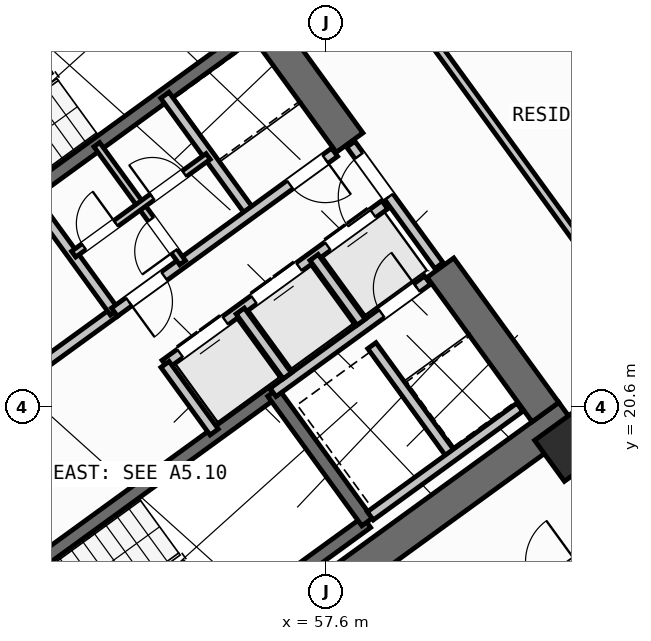
"""IFC4 building model, lengths in metres.
Left out: names, types, materials, properties, quantities, classifications, styles, units other than length and angle.
Written with IfcOpenShell. Run it as: python <this file> out.ifc"""

import sys

from ifc_helpers import new_model, si_unit, direction, frame, frame_2d, origin, origin_2d, place, context, subcontext, project, spatial, rectangle, hollow_rectangle, extrude, source, transform, mapped, element, fill, save


model = new_model("IFC4")
c1 = context("Model", 3, precision=1e-05, world=origin(), true_north=direction((0.0, 1.0)))
c2 = subcontext(c1, "Body", "Model", "MODEL_VIEW")
j1 = project(units=[si_unit("LENGTHUNIT", "METRE"), si_unit("PLANEANGLEUNIT", "RADIAN")], contexts=[c1])
p1 = place(None, origin())
s1 = spatial("IfcSite", under=j1, at=p1, CompositionType="ELEMENT")
p2 = place(p1, origin())
s2 = spatial("IfcBuilding", under=s1, at=p2, CompositionType="ELEMENT")
p3 = place(p2, frame((0.0, 0.0, 38.4)))
s3 = spatial("IfcBuildingStorey", under=s2, at=p3, CompositionType="ELEMENT", Elevation=38.4)
p4 = place(p3, frame((52.318, 13.11, 0.0), z_axis=(0.0, 0.0, 1.0), x_axis=(0.809019445368, 0.587781878776, 0.0)))
e1 = element("IfcWall", 1, at=p4, inside=s3, PredefinedType="SHEAR", context=c2, shape_type="SweptSolid", body=[
    extrude(rectangle(XDim=12.44, YDim=0.65, at=frame_2d((6.22, 0.0))), origin(), (0.0, 0.0, 1.0), 3.35),
])
p5 = place(p3, frame((44.325, 24.113, 0.0), z_axis=(0.0, 0.0, 1.0), x_axis=(0.809012664862, 0.58779121131, 0.0)))
e2 = element("IfcWall", 2, at=p5, inside=s3, PredefinedType="SHEAR", context=c2, shape_type="SweptSolid", body=[
    extrude(rectangle(XDim=12.44, YDim=0.65, at=frame_2d((6.22, 0.0))), origin(), (0.0, 0.0, 1.0), 3.35),
])
p6 = place(p3, frame((61.929, 20.494, 0.0), z_axis=(0.0, 0.0, 1.0), x_axis=(-0.58782982593, 0.808984607855, 0.0)))
e3 = element("IfcWall", 3, at=p6, inside=s3, PredefinedType="SHEAR", context=c2, shape_type="SweptSolid", body=[
    extrude(rectangle(XDim=3.525, YDim=0.65, at=frame_2d((1.762, 0.0))), origin(), (0.0, 0.0, 1.0), 3.35),
])
p7 = place(p3, frame((58.064, 25.813, 0.0), z_axis=(0.0, 0.0, 1.0), x_axis=(-0.58777996584, 0.809020835181, 0.0)))
e4 = element("IfcWall", 4, at=p7, inside=s3, PredefinedType="SHEAR", context=c2, shape_type="SweptSolid", body=[
    extrude(rectangle(XDim=6.375, YDim=0.65, at=frame_2d((3.188, 0.0))), origin(), (0.0, 0.0, 1.0), 3.35),
])
m1 = source(origin(), c2, "Body", "SweptSolid", [
    extrude(hollow_rectangle(XDim=1.0, YDim=1.0, WallThickness=0.04, at=origin_2d()), origin(), (0.0, 0.0, 1.0), 3.6),
])
p8 = place(p3, frame((62.414, 19.827, 0.0), z_axis=(0.0, 0.0, 1.0), x_axis=(0.809016994375, 0.587785252292, 0.0)))
e5 = element("IfcColumn", 5, at=p8, inside=s3, PredefinedType="COLUMN", context=c2, shape_type="MappedRepresentation", body=[
    mapped(m1, transform((0.0, 0.0, 0.0), scale=1.0)),
])
p9 = place(p3, frame((43.938, 25.192, 0.0), z_axis=(0.0, 0.0, 1.0), x_axis=(0.809016324578, 0.587786174187, 0.0)))
e6 = element("IfcWall", 6, at=p9, inside=s3, PredefinedType="STANDARD", context=c2, shape_type="SweptSolid", body=[
    extrude(rectangle(XDim=17.587, YDim=0.32, at=frame_2d((8.794, 0.0))), origin(), (0.0, 0.0, 1.0), 3.35),
])
p10 = place(p9, frame((14.914, 0.0, 0.0)))
e7 = element("IfcOpeningElement", 7, at=p10, cuts=e6, PredefinedType="OPENING", context=c2, shape_type="SweptSolid", body=[
    extrude(rectangle(XDim=1.05, YDim=2.15, at=frame_2d((0.525, 1.075))), frame((0.0, 0.17, 0.0), z_axis=(0.0, -1.0, 0.0), x_axis=(1.0, 0.0, 0.0)), (0.0, 0.0, 1.0), 0.34),
])
p11 = place(p9, frame((2.169, 0.0, 0.8)))
e8 = element("IfcOpeningElement", 8, at=p11, cuts=e6, PredefinedType="OPENING", context=c2, shape_type="SweptSolid", body=[
    extrude(rectangle(XDim=2.1, YDim=1.55, at=frame_2d((1.05, 0.775))), frame((0.0, 0.17, 0.0), z_axis=(0.0, -1.0, 0.0), x_axis=(1.0, 0.0, 0.0)), (0.0, 0.0, 1.0), 0.34),
])
p12 = place(p9, frame((7.319, 0.0, 0.8)))
e9 = element("IfcOpeningElement", 9, at=p12, cuts=e6, PredefinedType="OPENING", context=c2, shape_type="SweptSolid", body=[
    extrude(rectangle(XDim=2.1, YDim=1.55, at=frame_2d((1.05, 0.775))), frame((0.0, 0.17, 0.0), z_axis=(0.0, -1.0, 0.0), x_axis=(1.0, 0.0, 0.0)), (0.0, 0.0, 1.0), 0.34),
])
p13 = place(p3, frame((58.455, 35.484, 0.0), z_axis=(0.0, 0.0, 1.0), x_axis=(0.587783625747, -0.809018176127, 0.0)))
e10 = element("IfcWall", 10, at=p13, inside=s3, PredefinedType="STANDARD", context=c2, shape_type="SweptSolid", body=[
    extrude(rectangle(XDim=21.587, YDim=0.32, at=frame_2d((10.794, 0.0))), origin(), (0.0, 0.0, 1.0), 2.725),
])
p14 = place(p13, frame((1.529, 0.0, 0.85)))
e11 = element("IfcOpeningElement", 11, at=p14, cuts=e10, PredefinedType="OPENING", context=c2, shape_type="SweptSolid", body=[
    extrude(rectangle(XDim=1.8, YDim=1.5, at=frame_2d((0.9, 0.75))), frame((0.0, 0.17, 0.0), z_axis=(0.0, -1.0, 0.0), x_axis=(1.0, 0.0, 0.0)), (0.0, 0.0, 1.0), 0.34),
])
p15 = place(p13, frame((10.444, 0.0, 0.85)))
e12 = element("IfcOpeningElement", 12, at=p15, cuts=e10, PredefinedType="OPENING", context=c2, shape_type="SweptSolid", body=[
    extrude(rectangle(XDim=1.8, YDim=1.5, at=frame_2d((0.9, 0.75))), frame((0.0, 0.17, 0.0), z_axis=(0.0, -1.0, 0.0), x_axis=(1.0, 0.0, 0.0)), (0.0, 0.0, 1.0), 0.34),
])
p16 = place(p13, frame((17.595, 0.0, 0.85)))
e13 = element("IfcOpeningElement", 13, at=p16, cuts=e10, PredefinedType="OPENING", context=c2, shape_type="SweptSolid", body=[
    extrude(rectangle(XDim=1.5, YDim=1.5, at=frame_2d((0.75, 0.75))), frame((0.0, 0.17, 0.0), z_axis=(0.0, -1.0, 0.0), x_axis=(1.0, 0.0, 0.0)), (0.0, 0.0, 1.0), 0.34),
])
p17 = place(p3, frame((71.098, 17.731, 0.0), z_axis=(0.0, 0.0, 1.0), x_axis=(-0.809021120468, -0.587779573171, 0.0)))
e14 = element("IfcWall", 14, at=p17, inside=s3, PredefinedType="STANDARD", context=c2, shape_type="SweptSolid", body=[
    extrude(rectangle(XDim=17.588, YDim=0.32, at=frame_2d((8.794, 0.0))), origin(), (0.0, 0.0, 1.0), 3.35),
])
p18 = place(p17, frame((1.624, 0.0, 0.0)))
e15 = element("IfcOpeningElement", 15, at=p18, cuts=e14, PredefinedType="OPENING", context=c2, shape_type="SweptSolid", body=[
    extrude(rectangle(XDim=1.05, YDim=2.15, at=frame_2d((0.525, 1.075))), frame((0.0, 0.17, 0.0), z_axis=(0.0, -1.0, 0.0), x_axis=(1.0, 0.0, 0.0)), (0.0, 0.0, 1.0), 0.34),
])
p19 = place(p17, frame((4.104, 0.0, 1.0)))
e16 = element("IfcOpeningElement", 16, at=p19, cuts=e14, PredefinedType="OPENING", context=c2, shape_type="SweptSolid", body=[
    extrude(rectangle(XDim=0.9, YDim=1.25, at=frame_2d((0.45, 0.625))), frame((0.0, 0.17, 0.0), z_axis=(0.0, -1.0, 0.0), x_axis=(1.0, 0.0, 0.0)), (0.0, 0.0, 1.0), 0.34),
])
p20 = place(p17, frame((7.879, 0.0, 0.85)))
e17 = element("IfcOpeningElement", 17, at=p20, cuts=e14, PredefinedType="OPENING", context=c2, shape_type="SweptSolid", body=[
    extrude(rectangle(XDim=1.8, YDim=1.5, at=frame_2d((0.9, 0.75))), frame((0.0, 0.17, 0.0), z_axis=(0.0, -1.0, 0.0), x_axis=(1.0, 0.0, 0.0)), (0.0, 0.0, 1.0), 0.34),
])
p21 = place(p17, frame((13.529, 0.0, 0.85)))
e18 = element("IfcOpeningElement", 18, at=p21, cuts=e14, PredefinedType="OPENING", context=c2, shape_type="SweptSolid", body=[
    extrude(rectangle(XDim=1.5, YDim=1.5, at=frame_2d((0.75, 0.75))), frame((0.0, 0.17, 0.0), z_axis=(0.0, -1.0, 0.0), x_axis=(1.0, 0.0, 0.0)), (0.0, 0.0, 1.0), 0.34),
])
p22 = place(p3, frame((48.006, 25.996, 0.0), z_axis=(0.0, 0.0, 1.0), x_axis=(0.80901903764, 0.587782439969, 0.0)))
e19 = element("IfcWall", 19, at=p22, inside=s3, PredefinedType="SHEAR", context=c2, shape_type="SweptSolid", body=[
    extrude(rectangle(XDim=7.46, YDim=0.26, at=frame_2d((3.73, 0.0))), origin(), (0.0, 0.0, 1.0), 3.35),
])
p23 = place(p3, frame((49.863, 23.44, 0.0), z_axis=(0.0, 0.0, 1.0), x_axis=(0.809003474932, 0.587803859759, 0.0)))
e20 = element("IfcWall", 20, at=p23, inside=s3, PredefinedType="SHEAR", context=c2, shape_type="SweptSolid", body=[
    extrude(rectangle(XDim=7.46, YDim=0.26, at=frame_2d((3.73, 0.0))), origin(), (0.0, 0.0, 1.0), 3.35),
])
p24 = place(p23, frame((0.36, 0.0, 0.0)))
e21 = element("IfcOpeningElement", 21, at=p24, cuts=e20, PredefinedType="OPENING", context=c2, shape_type="SweptSolid", body=[
    extrude(rectangle(XDim=0.86, YDim=2.05, at=frame_2d((0.43, 1.025))), frame((0.0, 0.14, 0.0), z_axis=(0.0, -1.0, 0.0), x_axis=(1.0, 0.0, 0.0)), (0.0, 0.0, 1.0), 0.28),
])
p25 = place(p3, frame((52.472, 14.013, 0.0), z_axis=(0.0, 0.0, 1.0), x_axis=(0.809028366311, 0.587769599847, 0.0)))
e22 = element("IfcWall", 22, at=p25, inside=s3, PredefinedType="SHEAR", context=c2, shape_type="SweptSolid", body=[
    extrude(rectangle(XDim=7.33, YDim=0.26, at=frame_2d((3.665, 0.0))), origin(), (0.0, 0.0, 1.0), 3.35),
])
p26 = place(p3, frame((50.615, 16.57, 0.0), z_axis=(0.0, 0.0, 1.0), x_axis=(0.809028366311, 0.587769599847, 0.0)))
e23 = element("IfcWall", 23, at=p26, inside=s3, PredefinedType="SHEAR", context=c2, shape_type="SweptSolid", body=[
    extrude(rectangle(XDim=7.33, YDim=0.26, at=frame_2d((3.665, 0.0))), origin(), (0.0, 0.0, 1.0), 3.35),
])
p27 = place(p26, frame((0.22, 0.0, 0.0)))
e24 = element("IfcOpeningElement", 24, at=p27, cuts=e23, PredefinedType="OPENING", context=c2, shape_type="SweptSolid", body=[
    extrude(rectangle(XDim=1.1, YDim=2.1, at=frame_2d((0.55, 1.05))), frame((0.0, 0.14, 0.0), z_axis=(0.0, -1.0, 0.0), x_axis=(1.0, 0.0, 0.0)), (0.0, 0.0, 1.0), 0.28),
])
p28 = place(p3, frame((58.41, 18.327, 0.0), z_axis=(0.0, 0.0, 1.0), x_axis=(-0.58776738483, 0.809029975545, 0.0)))
e25 = element("IfcWall", 25, at=p28, inside=s3, PredefinedType="SHEAR", context=c2, shape_type="SweptSolid", body=[
    extrude(rectangle(XDim=3.16, YDim=0.26, at=frame_2d((1.58, 0.0))), origin(), (0.0, 0.0, 1.0), 3.35),
])
p29 = place(p3, frame((48.799, 19.107, 0.0), z_axis=(0.0, 0.0, 1.0), x_axis=(0.809012959416, 0.587790805897, 0.0)))
e26 = element("IfcWall", 26, at=p29, inside=s3, PredefinedType="STANDARD", context=c2, shape_type="SweptSolid", body=[
    extrude(rectangle(XDim=5.718, YDim=0.2, at=frame_2d((2.859, 0.0))), origin(), (0.0, 0.0, 1.0), 3.34),
])
p30 = place(p29, frame((2.498, 0.0, 0.0)))
e27 = element("IfcOpeningElement", 27, at=p30, cuts=e26, PredefinedType="OPENING", context=c2, shape_type="SweptSolid", body=[
    extrude(rectangle(XDim=1.15, YDim=2.1, at=frame_2d((0.575, 1.05))), frame((0.0, 0.11, 0.0), z_axis=(0.0, -1.0, 0.0), x_axis=(1.0, 0.0, 0.0)), (0.0, 0.0, 1.0), 0.22),
])
p31 = place(p3, frame((56.553, 20.884, 0.0), z_axis=(0.0, 0.0, 1.0), x_axis=(0.809035789462, 0.587759382205, 0.0)))
e28 = element("IfcWall", 28, at=p31, inside=s3, PredefinedType="STANDARD", context=c2, shape_type="SweptSolid", body=[
    extrude(rectangle(XDim=3.768, YDim=0.2, at=frame_2d((1.884, 0.0))), origin(), (0.0, 0.0, 1.0), 3.34),
])
p32 = place(p31, frame((2.65, 0.0, 0.0)))
e29 = element("IfcOpeningElement", 29, at=p32, cuts=e28, PredefinedType="OPENING", context=c2, shape_type="SweptSolid", body=[
    extrude(rectangle(XDim=0.86, YDim=2.05, at=frame_2d((0.43, 1.025))), frame((0.0, 0.11, 0.0), z_axis=(0.0, -1.0, 0.0), x_axis=(1.0, 0.0, 0.0)), (0.0, 0.0, 1.0), 0.22),
])
p33 = place(p3, frame((54.421, 21.436, 0.0), z_axis=(0.0, 0.0, 1.0), x_axis=(0.809013710463, 0.587789772183, 0.0)))
e30 = element("IfcWall", 30, at=p33, inside=s3, PredefinedType="STANDARD", context=c2, shape_type="SweptSolid", body=[
    extrude(rectangle(XDim=5.36, YDim=0.2, at=frame_2d((2.68, 0.0))), origin(), (0.0, 0.0, 1.0), 3.34),
])
p34 = place(p33, frame((0.37, 0.0, 0.0)))
e31 = element("IfcOpeningElement", 31, at=p34, cuts=e30, PredefinedType="OPENING", context=c2, shape_type="SweptSolid", body=[
    extrude(rectangle(XDim=1.1, YDim=2.15, at=frame_2d((0.55, 1.075))), frame((0.0, 0.11, 0.0), z_axis=(0.0, -1.0, 0.0), x_axis=(1.0, 0.0, 0.0)), (0.0, 0.0, 1.0), 0.22),
])
p35 = place(p33, frame((2.17, 0.0, 0.0)))
e32 = element("IfcOpeningElement", 32, at=p35, cuts=e30, PredefinedType="OPENING", context=c2, shape_type="SweptSolid", body=[
    extrude(rectangle(XDim=1.1, YDim=2.15, at=frame_2d((0.55, 1.075))), frame((0.0, 0.11, 0.0), z_axis=(0.0, -1.0, 0.0), x_axis=(1.0, 0.0, 0.0)), (0.0, 0.0, 1.0), 0.22),
])
p36 = place(p33, frame((3.97, 0.0, 0.0)))
e33 = element("IfcOpeningElement", 33, at=p36, cuts=e30, PredefinedType="OPENING", context=c2, shape_type="SweptSolid", body=[
    extrude(rectangle(XDim=1.1, YDim=2.15, at=frame_2d((0.55, 1.075))), frame((0.0, 0.11, 0.0), z_axis=(0.0, -1.0, 0.0), x_axis=(1.0, 0.0, 0.0)), (0.0, 0.0, 1.0), 0.22),
])
p37 = place(p3, frame((55.391, 20.102, 0.0), z_axis=(0.0, 0.0, 1.0), x_axis=(-0.58778447739, 0.809017557374, 0.0)))
e34 = element("IfcWall", 34, at=p37, inside=s3, PredefinedType="STANDARD", context=c2, shape_type="SweptSolid", body=[
    extrude(rectangle(XDim=1.65, YDim=0.2, at=frame_2d((0.825, 0.0))), origin(), (0.0, 0.0, 1.0), 3.34),
])
p38 = place(p3, frame((56.834, 21.212, 0.0), z_axis=(0.0, 0.0, 1.0), x_axis=(-0.58776738483, 0.809029975545, 0.0)))
e35 = element("IfcWall", 35, at=p38, inside=s3, PredefinedType="STANDARD", context=c2, shape_type="SweptSolid", body=[
    extrude(rectangle(XDim=1.58, YDim=0.2, at=frame_2d((0.79, 0.0))), origin(), (0.0, 0.0, 1.0), 3.34),
])
p39 = place(p3, frame((58.29, 22.27, 0.0), z_axis=(0.0, 0.0, 1.0), x_axis=(-0.587840865826, 0.808976585857, 0.0)))
e36 = element("IfcWall", 36, at=p39, inside=s3, PredefinedType="STANDARD", context=c2, shape_type="SweptSolid", body=[
    extrude(rectangle(XDim=1.58, YDim=0.2, at=frame_2d((0.79, 0.0))), origin(), (0.0, 0.0, 1.0), 3.34),
])
p40 = place(p3, frame((60.067, 19.655, 0.0), z_axis=(0.0, 0.0, 1.0), x_axis=(-0.587800520745, 0.809005900975, 0.0)))
e37 = element("IfcWall", 37, at=p40, inside=s3, PredefinedType="STANDARD", context=c2, shape_type="SweptSolid", body=[
    extrude(rectangle(XDim=2.66, YDim=0.2, at=frame_2d((1.33, 0.0))), origin(), (0.0, 0.0, 1.0), 3.34),
])
p41 = place(p3, frame((58.472, 18.447, 0.0), z_axis=(0.0, 0.0, 1.0), x_axis=(0.809022487728, 0.587777691266, 0.0)))
e38 = element("IfcWall", 38, at=p41, inside=s3, PredefinedType="STANDARD", context=c2, shape_type="SweptSolid", body=[
    extrude(rectangle(XDim=3.648, YDim=0.2, at=frame_2d((1.824, 0.0))), origin(), (0.0, 0.0, 1.0), 3.34),
])
p42 = place(p3, frame((53.425, 22.468, 0.0), z_axis=(0.0, 0.0, 1.0), x_axis=(-0.5877230039, 0.809062216821, 0.0)))
e39 = element("IfcWall", 39, at=p42, inside=s3, PredefinedType="STANDARD", context=c2, shape_type="SweptSolid", body=[
    extrude(rectangle(XDim=2.88, YDim=0.2, at=frame_2d((1.44, 0.0))), origin(), (0.0, 0.0, 1.0), 3.34),
])
p43 = place(p3, frame((56.111, 24.419, 0.0), z_axis=(0.0, 0.0, 1.0), x_axis=(-0.58777848983, 0.809021907548, 0.0)))
e40 = element("IfcWall", 40, at=p43, inside=s3, PredefinedType="STANDARD", context=c2, shape_type="SweptSolid", body=[
    extrude(rectangle(XDim=2.88, YDim=0.2, at=frame_2d((1.44, 0.0))), origin(), (0.0, 0.0, 1.0), 3.34),
])
p44 = place(p3, frame((53.425, 22.468, 0.0), z_axis=(0.0, 0.0, 1.0), x_axis=(0.80902705128, 0.587771409902, 0.0)))
e41 = element("IfcWall", 41, at=p44, inside=s3, PredefinedType="STANDARD", context=c2, shape_type="SweptSolid", body=[
    extrude(rectangle(XDim=5.368, YDim=0.2, at=frame_2d((2.684, 0.0))), origin(), (0.0, 0.0, 1.0), 3.34),
])
p45 = place(p44, frame((4.28, 0.0, 0.0)))
e42 = element("IfcOpeningElement", 42, at=p45, cuts=e41, PredefinedType="OPENING", context=c2, shape_type="SweptSolid", body=[
    extrude(rectangle(XDim=0.86, YDim=2.05, at=frame_2d((0.43, 1.025))), frame((0.0, 0.11, 0.0), z_axis=(0.0, -1.0, 0.0), x_axis=(1.0, 0.0, 0.0)), (0.0, 0.0, 1.0), 0.22),
])
p46 = place(p44, frame((0.35, 0.0, 0.0)))
e43 = element("IfcOpeningElement", 43, at=p46, cuts=e41, PredefinedType="OPENING", context=c2, shape_type="SweptSolid", body=[
    extrude(rectangle(XDim=0.86, YDim=2.05, at=frame_2d((0.43, 1.025))), frame((0.0, 0.11, 0.0), z_axis=(0.0, -1.0, 0.0), x_axis=(1.0, 0.0, 0.0)), (0.0, 0.0, 1.0), 0.22),
])
p47 = place(p3, frame((54.768, 23.443, 0.0), z_axis=(0.0, 0.0, 1.0), x_axis=(-0.587736077749, 0.809052719489, 0.0)))
e44 = element("IfcWall", 44, at=p47, inside=s3, PredefinedType="PLUMBINGWALL", context=c2, shape_type="SweptSolid", body=[
    extrude(rectangle(XDim=1.4, YDim=0.14, at=frame_2d((0.7, 0.0))), origin(), (0.0, 0.0, 1.0), 3.34),
])
p48 = place(p47, frame((0.28, 0.0, 0.0)))
e45 = element("IfcOpeningElement", 45, at=p48, cuts=e44, PredefinedType="OPENING", context=c2, shape_type="SweptSolid", body=[
    extrude(rectangle(XDim=0.78, YDim=2.05, at=frame_2d((0.39, 1.025))), frame((0.0, 0.08, 0.0), z_axis=(0.0, -1.0, 0.0), x_axis=(1.0, 0.0, 0.0)), (0.0, 0.0, 1.0), 0.16),
])
p49 = place(p3, frame((53.945, 24.576, 0.0), z_axis=(0.0, 0.0, 1.0), x_axis=(-0.587897037186, 0.808935766095, 0.0)))
e46 = element("IfcWall", 46, at=p49, inside=s3, PredefinedType="PLUMBINGWALL", context=c2, shape_type="SweptSolid", body=[
    extrude(rectangle(XDim=1.48, YDim=0.14, at=frame_2d((0.74, 0.0))), origin(), (0.0, 0.0, 1.0), 3.34),
])
p50 = place(p3, frame((52.618, 23.612, 0.0), z_axis=(0.0, 0.0, 1.0), x_axis=(0.809009587469, 0.587795446889, 0.0)))
e47 = element("IfcWall", 47, at=p50, inside=s3, PredefinedType="PLUMBINGWALL", context=c2, shape_type="SweptSolid", body=[
    extrude(rectangle(XDim=3.28, YDim=0.14, at=frame_2d((1.64, 0.0))), origin(), (0.0, 0.0, 1.0), 3.34),
])
p51 = place(p50, frame((0.25, 0.0, 0.0)))
e48 = element("IfcOpeningElement", 48, at=p51, cuts=e47, PredefinedType="OPENING", context=c2, shape_type="SweptSolid", body=[
    extrude(rectangle(XDim=0.78, YDim=2.05, at=frame_2d((0.39, 1.025))), frame((0.0, 0.08, 0.0), z_axis=(0.0, -1.0, 0.0), x_axis=(1.0, 0.0, 0.0)), (0.0, 0.0, 1.0), 0.16),
])
p52 = place(p50, frame((1.92, 0.0, 0.0)))
e49 = element("IfcOpeningElement", 49, at=p52, cuts=e47, PredefinedType="OPENING", context=c2, shape_type="SweptSolid", body=[
    extrude(rectangle(XDim=0.78, YDim=2.05, at=frame_2d((0.39, 1.025))), frame((0.0, 0.08, 0.0), z_axis=(0.0, -1.0, 0.0), x_axis=(1.0, 0.0, 0.0)), (0.0, 0.0, 1.0), 0.16),
])
p53 = place(p3, frame((59.827, 23.386, 0.0), z_axis=(0.0, 0.0, 1.0), x_axis=(-0.587803840107, 0.809003489211, 0.0)))
e50 = element("IfcWall", 50, at=p53, inside=s3, PredefinedType="STANDARD", context=c2, shape_type="SweptSolid", body=[
    extrude(rectangle(XDim=2.96, YDim=0.2, at=frame_2d((1.48, 0.0))), origin(), (0.0, 0.0, 1.0), 3.34),
])
p54 = place(p53, frame((1.68, 0.0, 0.0)))
e51 = element("IfcOpeningElement", 51, at=p54, cuts=e50, PredefinedType="OPENING", context=c2, shape_type="SweptSolid", body=[
    extrude(rectangle(XDim=1.0, YDim=2.1, at=frame_2d((0.5, 1.05))), frame((0.0, 0.11, 0.0), z_axis=(0.0, -1.0, 0.0), x_axis=(1.0, 0.0, 0.0)), (0.0, 0.0, 1.0), 0.22),
])
p55 = place(p3, frame((68.353, 15.922, 0.0), z_axis=(0.0, 0.0, 1.0), x_axis=(-0.587782002009, 0.809019355834, 0.0)))
e52 = element("IfcWall", 52, at=p55, inside=s3, PredefinedType="PARTITIONING", context=c2, shape_type="SweptSolid", body=[
    extrude(rectangle(XDim=15.35, YDim=0.16, at=frame_2d((7.675, 0.0))), origin(), (0.0, 0.0, 1.0), 3.34),
])
p56 = place(p3, frame((53.705, 11.126, 0.0), z_axis=(0.0, 0.0, 1.0), x_axis=(0.809014504436, 0.587788679384, 0.0)))
e53 = element("IfcWall", 53, at=p56, inside=s3, PredefinedType="PARTITIONING", context=c2, shape_type="SweptSolid", body=[
    extrude(rectangle(XDim=14.67, YDim=0.16, at=frame_2d((7.335, 0.0))), origin(), (0.0, 0.0, 1.0), 3.34),
])
p57 = place(p56, frame((3.215, 0.0, 0.0)))
e54 = element("IfcOpeningElement", 54, at=p57, cuts=e53, PredefinedType="OPENING", context=c2, shape_type="SweptSolid", body=[
    extrude(rectangle(XDim=1.0, YDim=2.1, at=frame_2d((0.5, 1.05))), frame((0.0, 0.09, 0.0), z_axis=(0.0, -1.0, 0.0), x_axis=(1.0, 0.0, 0.0)), (0.0, 0.0, 1.0), 0.18),
])
p58 = place(p56, frame((9.915, 0.0, 0.0)))
e55 = element("IfcOpeningElement", 55, at=p58, cuts=e53, PredefinedType="OPENING", context=c2, shape_type="SweptSolid", body=[
    extrude(rectangle(XDim=1.0, YDim=2.1, at=frame_2d((0.5, 1.05))), frame((0.0, 0.09, 0.0), z_axis=(0.0, -1.0, 0.0), x_axis=(1.0, 0.0, 0.0)), (0.0, 0.0, 1.0), 0.18),
])
m2 = source(origin(), c2, "Body", "SweptSolid", [
    extrude(rectangle(XDim=1.1, YDim=2.15, at=frame_2d((0.55, 1.075))), frame((0.0, 0.025, 0.0), z_axis=(0.0, -1.0, 0.0), x_axis=(1.0, 0.0, 0.0)), (0.0, 0.0, 1.0), 0.05),
])
p59 = place(p34, origin())
e56 = element("IfcDoor", 56, at=p59, inside=s3, OperationType="DOUBLE_DOOR_SLIDING", PredefinedType="DOOR", context=c2, shape_type="MappedRepresentation", body=[
    mapped(m2, transform((0.0, 0.0, 0.0), scale=1.0)),
])
fill(e31, e56)
p60 = place(p35, origin())
e57 = element("IfcDoor", 57, at=p60, inside=s3, OperationType="DOUBLE_DOOR_SLIDING", PredefinedType="DOOR", context=c2, shape_type="MappedRepresentation", body=[
    mapped(m2, transform((0.0, 0.0, 0.0), scale=1.0)),
])
fill(e32, e57)
p61 = place(p36, origin())
e58 = element("IfcDoor", 58, at=p61, inside=s3, OperationType="DOUBLE_DOOR_SLIDING", PredefinedType="DOOR", context=c2, shape_type="MappedRepresentation", body=[
    mapped(m2, transform((0.0, 0.0, 0.0), scale=1.0)),
])
fill(e33, e58)
m3 = source(origin(), c2, "Body", "SweptSolid", [
    extrude(rectangle(XDim=0.86, YDim=2.05, at=frame_2d((0.43, 1.025))), frame((0.0, 0.025, 0.0), z_axis=(0.0, -1.0, 0.0), x_axis=(1.0, 0.0, 0.0)), (0.0, 0.0, 1.0), 0.05),
])
p62 = place(p32, origin())
e59 = element("IfcDoor", 59, at=p62, inside=s3, OperationType="SINGLE_SWING_RIGHT", PredefinedType="DOOR", context=c2, shape_type="MappedRepresentation", body=[
    mapped(m3, transform((0.0, 0.0, 0.0), scale=1.0)),
])
fill(e29, e59)
p63 = place(p45, frame((0.86, 0.0, 0.0), z_axis=(0.0, 0.0, 1.0), x_axis=(-1.0, 0.0, 0.0)))
e60 = element("IfcDoor", 60, at=p63, inside=s3, OperationType="SINGLE_SWING_LEFT", PredefinedType="DOOR", context=c2, shape_type="MappedRepresentation", body=[
    mapped(m3, transform((0.0, 0.0, 0.0), scale=1.0)),
])
fill(e42, e60)
p64 = place(p46, frame((0.86, 0.0, 0.0), z_axis=(0.0, 0.0, 1.0), x_axis=(-1.0, 0.0, 0.0)))
e61 = element("IfcDoor", 61, at=p64, inside=s3, OperationType="SINGLE_SWING_RIGHT", PredefinedType="DOOR", context=c2, shape_type="MappedRepresentation", body=[
    mapped(m3, transform((0.0, 0.0, 0.0), scale=1.0)),
])
fill(e43, e61)
m4 = source(origin(), c2, "Body", "SweptSolid", [
    extrude(rectangle(XDim=0.78, YDim=2.05, at=frame_2d((0.39, 1.025))), frame((0.0, 0.025, 0.0), z_axis=(0.0, -1.0, 0.0), x_axis=(1.0, 0.0, 0.0)), (0.0, 0.0, 1.0), 0.05),
])
p65 = place(p48, origin())
e62 = element("IfcDoor", 62, at=p65, inside=s3, OperationType="SINGLE_SWING_LEFT", PredefinedType="DOOR", context=c2, shape_type="MappedRepresentation", body=[
    mapped(m4, transform((0.0, 0.0, 0.0), scale=1.0)),
])
fill(e45, e62)
p66 = place(p51, origin())
e63 = element("IfcDoor", 63, at=p66, inside=s3, OperationType="SINGLE_SWING_RIGHT", PredefinedType="DOOR", context=c2, shape_type="MappedRepresentation", body=[
    mapped(m4, transform((0.0, 0.0, 0.0), scale=1.0)),
])
fill(e48, e63)
p67 = place(p52, origin())
e64 = element("IfcDoor", 64, at=p67, inside=s3, OperationType="SINGLE_SWING_LEFT", PredefinedType="DOOR", context=c2, shape_type="MappedRepresentation", body=[
    mapped(m4, transform((0.0, 0.0, 0.0), scale=1.0)),
])
fill(e49, e64)
m5 = source(origin(), c2, "Body", "SweptSolid", [
    extrude(rectangle(XDim=1.0, YDim=2.1, at=frame_2d((0.5, 1.05))), frame((0.0, 0.025, 0.0), z_axis=(0.0, -1.0, 0.0), x_axis=(1.0, 0.0, 0.0)), (0.0, 0.0, 1.0), 0.05),
])
p68 = place(p54, origin())
e65 = element("IfcDoor", 65, at=p68, inside=s3, OperationType="SINGLE_SWING_LEFT", PredefinedType="DOOR", context=c2, shape_type="MappedRepresentation", body=[
    mapped(m5, transform((0.0, 0.0, 0.0), scale=1.0)),
])
fill(e51, e65)
p69 = place(p58, origin())
e66 = element("IfcDoor", 66, at=p69, inside=s3, OperationType="SINGLE_SWING_RIGHT", PredefinedType="DOOR", context=c2, shape_type="MappedRepresentation", body=[
    mapped(m5, transform((0.0, 0.0, 0.0), scale=1.0)),
])
fill(e55, e66)
save(model, sys.argv[1])
